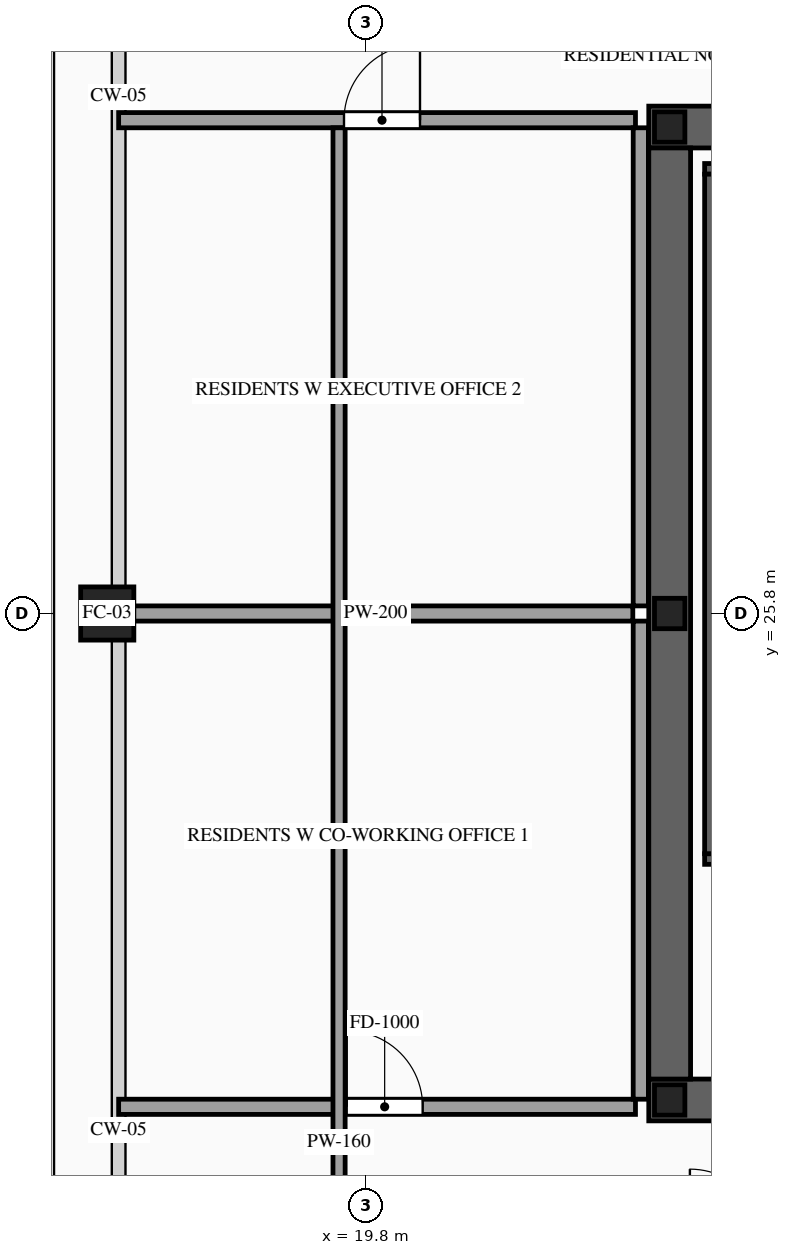
"""IFC4 building model, lengths in metres.
Left out: names, types, materials, properties, quantities, classifications, styles, units other than length and angle.
Written with IfcOpenShell. Run it as: python <this file> out.ifc"""

import sys

from ifc_helpers import new_model, si_unit, direction, frame, frame_2d, origin, origin_2d, place, context, subcontext, project, spatial, rectangle, hollow_rectangle, i_section, extrude, source, transform, mapped, element, fill, save


model = new_model("IFC4")
c1 = context("Model", 3, precision=1e-05, world=origin(), true_north=direction((0.0, 1.0)))
c2 = subcontext(c1, "Body", "Model", "MODEL_VIEW")
j1 = project(units=[si_unit("LENGTHUNIT", "METRE"), si_unit("PLANEANGLEUNIT", "RADIAN")], contexts=[c1])
p1 = place(None, origin())
s1 = spatial("IfcSite", under=j1, at=p1, CompositionType="ELEMENT")
p2 = place(p1, origin())
s2 = spatial("IfcBuilding", under=s1, at=p2, CompositionType="ELEMENT")
p3 = place(p2, frame((0.0, 0.0, 252.1)))
s3 = spatial("IfcBuildingStorey", under=s2, at=p3, CompositionType="ELEMENT", Elevation=252.1)
p4 = place(p3, frame((23.525, 19.4, 0.0), z_axis=(0.0, 0.0, 1.0), x_axis=(1.0, 0.0, 0.0)))
e1 = element("IfcWall", 1, at=p4, inside=s3, PredefinedType="SHEAR", context=c2, shape_type="SweptSolid", body=[
    extrude(rectangle(XDim=26.95, YDim=0.55, at=frame_2d((13.475, 0.0))), origin(), (0.0, 0.0, 1.0), 3.5),
])
p5 = place(p4, frame((1.925, 0.0, 0.0)))
e2 = element("IfcOpeningElement", 2, at=p5, cuts=e1, PredefinedType="OPENING", context=c2, shape_type="SweptSolid", body=[
    extrude(rectangle(XDim=1.1, YDim=2.2, at=frame_2d((0.55, 1.1))), frame((0.0, 0.29, 0.0), z_axis=(0.0, -1.0, 0.0), x_axis=(1.0, 0.0, 0.0)), (0.0, 0.0, 1.0), 0.58),
])
p6 = place(p4, frame((9.825, 0.0, 0.0)))
e3 = element("IfcOpeningElement", 3, at=p6, cuts=e1, PredefinedType="OPENING", context=c2, shape_type="SweptSolid", body=[
    extrude(rectangle(XDim=1.1, YDim=2.2, at=frame_2d((0.55, 1.1))), frame((0.0, 0.29, 0.0), z_axis=(0.0, -1.0, 0.0), x_axis=(1.0, 0.0, 0.0)), (0.0, 0.0, 1.0), 0.58),
])
p7 = place(p4, frame((23.025, 0.0, 0.0)))
e4 = element("IfcOpeningElement", 4, at=p7, cuts=e1, PredefinedType="OPENING", context=c2, shape_type="SweptSolid", body=[
    extrude(rectangle(XDim=1.1, YDim=2.2, at=frame_2d((0.55, 1.1))), frame((0.0, 0.29, 0.0), z_axis=(0.0, -1.0, 0.0), x_axis=(1.0, 0.0, 0.0)), (0.0, 0.0, 1.0), 0.58),
])
p8 = place(p4, frame((19.645, 0.0, 0.0)))
e5 = element("IfcOpeningElement", 5, at=p8, cuts=e1, PredefinedType="OPENING", context=c2, shape_type="SweptSolid", body=[
    extrude(rectangle(XDim=0.9, YDim=2.15, at=frame_2d((0.45, 1.075))), frame((0.0, 0.29, 0.0), z_axis=(0.0, -1.0, 0.0), x_axis=(1.0, 0.0, 0.0)), (0.0, 0.0, 1.0), 0.58),
])
p9 = place(p4, frame((18.205, 0.0, 0.0)))
e6 = element("IfcOpeningElement", 6, at=p9, cuts=e1, PredefinedType="OPENING", context=c2, shape_type="SweptSolid", body=[
    extrude(rectangle(XDim=0.9, YDim=2.15, at=frame_2d((0.45, 1.075))), frame((0.0, 0.29, 0.0), z_axis=(0.0, -1.0, 0.0), x_axis=(1.0, 0.0, 0.0)), (0.0, 0.0, 1.0), 0.58),
])
p10 = place(p3, frame((23.525, 32.2, 0.0), z_axis=(0.0, 0.0, 1.0), x_axis=(1.0, 0.0, 0.0)))
e7 = element("IfcWall", 7, at=p10, inside=s3, PredefinedType="SHEAR", context=c2, shape_type="SweptSolid", body=[
    extrude(rectangle(XDim=26.95, YDim=0.55, at=frame_2d((13.475, 0.0))), origin(), (0.0, 0.0, 1.0), 3.5),
])
p11 = place(p10, frame((4.545, 0.0, 0.0)))
e8 = element("IfcOpeningElement", 8, at=p11, cuts=e7, PredefinedType="OPENING", context=c2, shape_type="SweptSolid", body=[
    extrude(rectangle(XDim=0.9, YDim=2.15, at=frame_2d((0.45, 1.075))), frame((0.0, 0.29, 0.0), z_axis=(0.0, -1.0, 0.0), x_axis=(1.0, 0.0, 0.0)), (0.0, 0.0, 1.0), 0.58),
])
p12 = place(p10, frame((9.825, 0.0, 0.0)))
e9 = element("IfcOpeningElement", 9, at=p12, cuts=e7, PredefinedType="OPENING", context=c2, shape_type="SweptSolid", body=[
    extrude(rectangle(XDim=1.1, YDim=2.2, at=frame_2d((0.55, 1.1))), frame((0.0, 0.29, 0.0), z_axis=(0.0, -1.0, 0.0), x_axis=(1.0, 0.0, 0.0)), (0.0, 0.0, 1.0), 0.58),
])
p13 = place(p10, frame((15.675, 0.0, 0.0)))
e10 = element("IfcOpeningElement", 10, at=p13, cuts=e7, PredefinedType="OPENING", context=c2, shape_type="SweptSolid", body=[
    extrude(rectangle(XDim=1.1, YDim=2.2, at=frame_2d((0.55, 1.1))), frame((0.0, 0.29, 0.0), z_axis=(0.0, -1.0, 0.0), x_axis=(1.0, 0.0, 0.0)), (0.0, 0.0, 1.0), 0.58),
])
m1 = source(origin(), c2, "Body", "SweptSolid", [
    extrude(rectangle(XDim=12.25, YDim=0.55, at=frame_2d((6.125, 0.0))), origin(), (0.0, 0.0, 1.0), 3.5),
])
p14 = place(p3, frame((23.8, 19.675, 0.0), z_axis=(0.0, 0.0, 1.0), x_axis=(0.0, 1.0, 0.0)))
e11 = element("IfcWall", 11, at=p14, inside=s3, PredefinedType="SHEAR", context=c2, shape_type="MappedRepresentation", body=[
    mapped(m1, transform((0.0, 0.0, 0.0), scale=1.0)),
])
m2 = source(origin(), c2, "Body", "SweptSolid", [
    extrude(i_section(OverallWidth=0.4, OverallDepth=0.4, WebThickness=0.013, FlangeThickness=0.021, at=origin_2d()), origin(), (0.0, 0.0, 1.0), 3.5),
])
for number, where, z_axis, x_axis in (
    (12, (23.8, 19.4, 0.0), (0.0, 0.0, 1.0), (1.0, 0.0, 0.0)),
    (13, (23.8, 25.8, 0.0), (0.0, 0.0, 1.0), (1.0, 0.0, 0.0)),
    (14, (23.8, 32.2, 0.0), (0.0, 0.0, 1.0), (1.0, 0.0, 0.0)),
):
    element("IfcColumn", number, at=place(p3, frame(where, z_axis=z_axis, x_axis=x_axis)), inside=s3, PredefinedType="COLUMN", context=c2, shape_type="MappedRepresentation", body=[
        mapped(m2, transform((0.0, 0.0, 0.0), scale=1.0)),
    ])
m3 = source(origin(), c2, "Body", "SweptSolid", [
    extrude(hollow_rectangle(XDim=0.7, YDim=0.7, WallThickness=0.032, at=origin_2d()), origin(), (0.0, 0.0, 1.0), 3.5),
])
p15 = place(p3, frame((16.4, 25.8, 0.0), z_axis=(0.0, 0.0, 1.0), x_axis=(1.0, 0.0, 0.0)))
e15 = element("IfcColumn", 15, at=p15, inside=s3, PredefinedType="COLUMN", context=c2, shape_type="MappedRepresentation", body=[
    mapped(m3, transform((0.0, 0.0, 0.0), scale=1.0)),
])
p16 = place(p3, frame((24.26, 22.57, 0.0), z_axis=(0.0, 0.0, 1.0), x_axis=(1.0, 0.0, 0.0)))
e16 = element("IfcWall", 16, at=p16, inside=s3, PredefinedType="SOLIDWALL", context=c2, shape_type="SweptSolid", body=[
    extrude(rectangle(XDim=3.28, YDim=0.14, at=frame_2d((1.64, 0.0))), origin(), (0.0, 0.0, 1.0), 3.28),
])
p17 = place(p16, frame((1.09, 0.0, 0.0)))
e17 = element("IfcOpeningElement", 17, at=p17, cuts=e16, PredefinedType="OPENING", context=c2, shape_type="SweptSolid", body=[
    extrude(rectangle(XDim=1.1, YDim=2.2, at=frame_2d((0.55, 1.1))), frame((0.0, 0.085, 0.0), z_axis=(0.0, -1.0, 0.0), x_axis=(1.0, 0.0, 0.0)), (0.0, 0.0, 1.0), 0.17),
])
m4 = source(origin(), c2, "Body", "SweptSolid", [
    extrude(rectangle(XDim=3.28, YDim=0.14, at=frame_2d((1.64, 0.0))), origin(), (0.0, 0.0, 1.0), 3.28),
])
p18 = place(p3, frame((24.26, 31.65, 0.0), z_axis=(0.0, 0.0, 1.0), x_axis=(1.0, 0.0, 0.0)))
e18 = element("IfcWall", 18, at=p18, inside=s3, PredefinedType="SOLIDWALL", context=c2, shape_type="MappedRepresentation", body=[
    mapped(m4, transform((0.0, 0.0, 0.0), scale=1.0)),
])
m5 = source(origin(), c2, "Body", "SweptSolid", [
    extrude(rectangle(XDim=8.94, YDim=0.14, at=frame_2d((4.47, 0.0))), origin(), (0.0, 0.0, 1.0), 3.28),
])
p19 = place(p3, frame((24.33, 22.64, 0.0), z_axis=(0.0, 0.0, 1.0), x_axis=(0.0, 1.0, 0.0)))
e19 = element("IfcWall", 19, at=p19, inside=s3, PredefinedType="SOLIDWALL", context=c2, shape_type="MappedRepresentation", body=[
    mapped(m5, transform((0.0, 0.0, 0.0), scale=1.0)),
])
p20 = place(p3, frame((16.55, 19.31, 0.0), z_axis=(0.0, 0.0, 1.0), x_axis=(1.0, 0.0, 0.0)))
e20 = element("IfcWall", 20, at=p20, inside=s3, PredefinedType="PARTITIONING", context=c2, shape_type="SweptSolid", body=[
    extrude(rectangle(XDim=6.8, YDim=0.2, at=frame_2d((3.4, 0.0))), origin(), (0.0, 0.0, 1.0), 2.825),
])
p21 = place(p20, frame((3.0, 0.0, 0.0)))
e21 = element("IfcOpeningElement", 21, at=p21, cuts=e20, PredefinedType="OPENING", context=c2, shape_type="SweptSolid", body=[
    extrude(rectangle(XDim=1.0, YDim=2.2, at=frame_2d((0.5, 1.1))), frame((0.0, 0.115, 0.0), z_axis=(0.0, -1.0, 0.0), x_axis=(1.0, 0.0, 0.0)), (0.0, 0.0, 1.0), 0.23),
])
m6 = source(origin(), c2, "Body", "SweptSolid", [
    extrude(rectangle(XDim=6.765, YDim=0.2, at=frame_2d((3.382, 0.0))), origin(), (0.0, 0.0, 1.0), 2.787),
])
p22 = place(p3, frame((16.55, 25.8, 0.0), z_axis=(0.0, 0.0, 1.0), x_axis=(1.0, 0.0, 0.0)))
e22 = element("IfcWall", 22, at=p22, inside=s3, PredefinedType="PARTITIONING", context=c2, shape_type="MappedRepresentation", body=[
    mapped(m6, transform((0.0, 0.0, 0.0), scale=1.0)),
])
m7 = source(origin(), c2, "Body", "SweptSolid", [
    extrude(rectangle(XDim=6.29, YDim=0.2, at=frame_2d((3.145, 0.0))), origin(), (0.0, 0.0, 1.0), 3.28),
])
p23 = place(p3, frame((23.42, 19.41, 0.0), z_axis=(0.0, 0.0, 1.0), x_axis=(0.0, 1.0, 0.0)))
e23 = element("IfcWall", 23, at=p23, inside=s3, PredefinedType="PARTITIONING", context=c2, shape_type="MappedRepresentation", body=[
    mapped(m7, transform((0.0, 0.0, 0.0), scale=1.0)),
])
p24 = place(p3, frame((16.55, 32.29, 0.0), z_axis=(0.0, 0.0, 1.0), x_axis=(1.0, 0.0, 0.0)))
e24 = element("IfcWall", 24, at=p24, inside=s3, PredefinedType="PARTITIONING", context=c2, shape_type="SweptSolid", body=[
    extrude(rectangle(XDim=6.8, YDim=0.2, at=frame_2d((3.4, 0.0))), origin(), (0.0, 0.0, 1.0), 2.825),
])
p25 = place(p24, frame((2.965, 0.0, 0.0)))
e25 = element("IfcOpeningElement", 25, at=p25, cuts=e24, PredefinedType="OPENING", context=c2, shape_type="SweptSolid", body=[
    extrude(rectangle(XDim=1.0, YDim=2.2, at=frame_2d((0.5, 1.1))), frame((0.0, 0.115, 0.0), z_axis=(0.0, -1.0, 0.0), x_axis=(1.0, 0.0, 0.0)), (0.0, 0.0, 1.0), 0.23),
])
m8 = source(origin(), c2, "Body", "SweptSolid", [
    extrude(rectangle(XDim=26.69, YDim=0.16, at=frame_2d((13.345, 0.0))), origin(), (0.0, 0.0, 1.0), 3.28),
])
p26 = place(p3, frame((19.45, 5.5, 0.0), z_axis=(0.0, 0.0, 1.0), x_axis=(0.0, 1.0, 0.0)))
e26 = element("IfcWall", 26, at=p26, inside=s3, PredefinedType="PARTITIONING", context=c2, shape_type="MappedRepresentation", body=[
    mapped(m8, transform((0.0, 0.0, 0.0), scale=1.0)),
])
p27 = place(p3, frame((23.42, 25.9, 0.0), z_axis=(0.0, 0.0, 1.0), x_axis=(0.0, 1.0, 0.0)))
e27 = element("IfcWall", 27, at=p27, inside=s3, PredefinedType="PARTITIONING", context=c2, shape_type="MappedRepresentation", body=[
    mapped(m7, transform((0.0, 0.0, 0.0), scale=1.0)),
])
m9 = source(origin(), c2, "Body", "SweptSolid", [
    extrude(rectangle(XDim=1.0, YDim=2.2, at=frame_2d((0.5, 1.1))), frame((0.0, 0.025, 0.0), z_axis=(0.0, -1.0, 0.0), x_axis=(1.0, 0.0, 0.0)), (0.0, 0.0, 1.0), 0.05),
])
p28 = place(p21, origin())
e28 = element("IfcDoor", 28, at=p28, inside=s3, OperationType="SINGLE_SWING_LEFT", PredefinedType="DOOR", context=c2, shape_type="MappedRepresentation", body=[
    mapped(m9, transform((0.0, 0.0, 0.0), scale=1.0)),
])
fill(e21, e28)
p29 = place(p25, origin())
e29 = element("IfcDoor", 29, at=p29, inside=s3, OperationType="SINGLE_SWING_RIGHT", PredefinedType="DOOR", context=c2, shape_type="MappedRepresentation", body=[
    mapped(m9, transform((0.0, 0.0, 0.0), scale=1.0)),
])
fill(e25, e29)
save(model, sys.argv[1])
